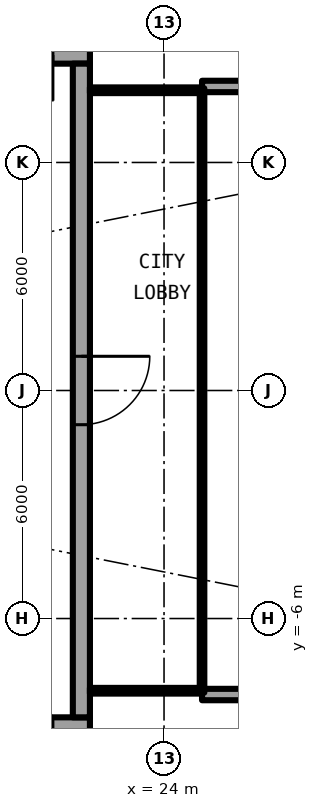
"""IFC4 building model, lengths in metres.
Left out: names, types, materials, properties, quantities, classifications, styles, units other than length and angle.
Written with IfcOpenShell. Run it as: python <this file> out.ifc"""

import sys

from ifc_helpers import new_model, si_unit, direction, frame, frame_2d, origin, place, context, subcontext, project, spatial, rectangle, extrude, element, fill, save


model = new_model("IFC4")
c1 = context("Model", 3, precision=1e-05, world=origin(), true_north=direction((0.0, 1.0)))
c2 = subcontext(c1, "Body", "Model", "MODEL_VIEW")
j1 = project(units=[si_unit("LENGTHUNIT", "METRE"), si_unit("PLANEANGLEUNIT", "RADIAN")], contexts=[c1])
p1 = place(None, origin())
s1 = spatial("IfcSite", under=j1, at=p1, CompositionType="ELEMENT")
p2 = place(p1, origin())
s2 = spatial("IfcBuilding", under=s1, at=p2, CompositionType="ELEMENT")
p3 = place(p2, frame((0.0, 0.0, 218.8)))
s3 = spatial("IfcBuildingStorey", under=s2, at=p3, CompositionType="ELEMENT", Elevation=218.8)
for number, where, z_axis, x_axis in (
    (1, (25.0, 8.0, 0.0), (0.0, 0.0, 1.0), (1.0, 0.0, 0.0)),
    (2, (25.0, -8.0, 0.0), (0.0, 0.0, 1.0), (1.0, 0.0, 0.0)),
):
    element("IfcWall", number, at=place(p3, frame(where, z_axis=z_axis, x_axis=x_axis)), inside=s3, PredefinedType="SOLIDWALL", context=c2, shape_type="SweptSolid", body=[
        extrude(rectangle(XDim=2.667, YDim=0.3, at=frame_2d((1.333, 0.0))), origin(), (0.0, 0.0, 1.0), 2.65),
    ])
p4 = place(p3, frame((22.05, 8.825, 0.0), z_axis=(0.0, 0.0, 1.0), x_axis=(-1.0, 0.0, 0.0)))
e3 = element("IfcWall", 3, at=p4, inside=s3, PredefinedType="SHEAR", context=c2, shape_type="SweptSolid", body=[
    extrude(rectangle(XDim=13.5, YDim=0.45, at=frame_2d((6.75, 0.0))), origin(), (0.0, 0.0, 1.0), 3.05),
])
p5 = place(p4, frame((0.975, 0.0, 0.0)))
e4 = element("IfcOpeningElement", 4, at=p5, cuts=e3, PredefinedType="OPENING", context=c2, shape_type="SweptSolid", body=[
    extrude(rectangle(XDim=1.2, YDim=2.3, at=frame_2d((0.6, 1.15))), frame((0.0, 0.235, 0.0), z_axis=(0.0, -1.0, 0.0), x_axis=(1.0, 0.0, 0.0)), (0.0, 0.0, 1.0), 0.47),
])
p6 = place(p3, frame((8.55, -8.825, 0.0), z_axis=(0.0, 0.0, 1.0), x_axis=(1.0, 0.0, 0.0)))
e5 = element("IfcWall", 5, at=p6, inside=s3, PredefinedType="SHEAR", context=c2, shape_type="SweptSolid", body=[
    extrude(rectangle(XDim=13.5, YDim=0.45, at=frame_2d((6.75, 0.0))), origin(), (0.0, 0.0, 1.0), 3.05),
])
p7 = place(p6, frame((11.325, 0.0, 0.0)))
e6 = element("IfcOpeningElement", 6, at=p7, cuts=e5, PredefinedType="OPENING", context=c2, shape_type="SweptSolid", body=[
    extrude(rectangle(XDim=1.2, YDim=2.3, at=frame_2d((0.6, 1.15))), frame((0.0, 0.235, 0.0), z_axis=(0.0, -1.0, 0.0), x_axis=(1.0, 0.0, 0.0)), (0.0, 0.0, 1.0), 0.47),
])
p8 = place(p3, frame((21.825, 8.6, 0.0), z_axis=(0.0, 0.0, 1.0), x_axis=(0.0, -1.0, 0.0)))
e7 = element("IfcWall", 7, at=p8, inside=s3, PredefinedType="SHEAR", context=c2, shape_type="SweptSolid", body=[
    extrude(rectangle(XDim=17.2, YDim=0.45, at=frame_2d((8.6, 0.0))), origin(), (0.0, 0.0, 1.0), 3.05),
])
p9 = place(p8, frame((7.7, 0.0, 0.0)))
e8 = element("IfcOpeningElement", 8, at=p9, cuts=e7, PredefinedType="OPENING", context=c2, shape_type="SweptSolid", body=[
    extrude(rectangle(XDim=1.8, YDim=2.3, at=frame_2d((0.9, 1.15))), frame((0.0, 0.235, 0.0), z_axis=(0.0, -1.0, 0.0), x_axis=(1.0, 0.0, 0.0)), (0.0, 0.0, 1.0), 0.47),
])
for number, where, z_axis, x_axis in (
    (9, (22.05, -7.9, 0.0), (0.0, 0.0, 1.0), (1.0, 0.0, 0.0)),
    (10, (22.05, 7.9, 0.0), (0.0, 0.0, 1.0), (1.0, 0.0, 0.0)),
):
    element("IfcWall", number, at=place(p3, frame(where, z_axis=z_axis, x_axis=x_axis)), inside=s3, PredefinedType="PARTITIONING", context=c2, shape_type="SweptSolid", body=[
        extrude(rectangle(XDim=2.89, YDim=0.15, at=frame_2d((1.445, 0.0))), origin(), (0.0, 0.0, 1.0), 2.65),
    ])
p10 = place(p3, frame((25.0, -7.95, 0.0), z_axis=(0.0, 0.0, 1.0), x_axis=(0.0, 1.0, 0.0)))
e11 = element("IfcWall", 11, at=p10, inside=s3, PredefinedType="PARTITIONING", context=c2, shape_type="SweptSolid", body=[
    extrude(rectangle(XDim=15.9, YDim=0.12, at=frame_2d((7.95, 0.0))), origin(), (0.0, 0.0, 1.0), 2.65),
])
p11 = place(p10, frame((0.95, 0.0, 0.1)))
e12 = element("IfcOpeningElement", 12, at=p11, cuts=e11, PredefinedType="OPENING", context=c2, shape_type="SweptSolid", body=[
    extrude(rectangle(XDim=14.0, YDim=1.85, at=frame_2d((7.0, 0.925))), frame((0.0, 0.07, 0.0), z_axis=(0.0, -1.0, 0.0), x_axis=(1.0, 0.0, 0.0)), (0.0, 0.0, 1.0), 0.14),
])
p12 = place(p5, origin())
e13 = element("IfcDoor", 13, at=p12, inside=s3, OperationType="SINGLE_SWING_RIGHT", PredefinedType="DOOR", context=c2, shape_type="SweptSolid", body=[
    extrude(rectangle(XDim=1.2, YDim=2.3, at=frame_2d((0.6, 1.15))), frame((0.0, 0.025, 0.0), z_axis=(0.0, -1.0, 0.0), x_axis=(1.0, 0.0, 0.0)), (0.0, 0.0, 1.0), 0.05),
])
fill(e4, e13)
p13 = place(p7, origin())
e14 = element("IfcDoor", 14, at=p13, inside=s3, OperationType="SINGLE_SWING_LEFT", PredefinedType="DOOR", context=c2, shape_type="SweptSolid", body=[
    extrude(rectangle(XDim=1.2, YDim=2.3, at=frame_2d((0.6, 1.15))), frame((0.0, 0.025, 0.0), z_axis=(0.0, -1.0, 0.0), x_axis=(1.0, 0.0, 0.0)), (0.0, 0.0, 1.0), 0.05),
])
fill(e6, e14)
p14 = place(p9, origin())
e15 = element("IfcDoor", 15, at=p14, inside=s3, OperationType="SINGLE_SWING_LEFT", PredefinedType="DOOR", context=c2, shape_type="SweptSolid", body=[
    extrude(rectangle(XDim=1.8, YDim=2.3, at=frame_2d((0.9, 1.15))), frame((0.0, 0.025, 0.0), z_axis=(0.0, -1.0, 0.0), x_axis=(1.0, 0.0, 0.0)), (0.0, 0.0, 1.0), 0.05),
])
fill(e8, e15)
p15 = place(p11, origin())
e16 = element("IfcWindow", 16, at=p15, inside=s3, PartitioningType="SINGLE_PANEL", PredefinedType="WINDOW", context=c2, shape_type="SweptSolid", body=[
    extrude(rectangle(XDim=14.0, YDim=1.85, at=frame_2d((7.0, 0.925))), frame((0.0, 0.03, 0.0), z_axis=(0.0, -1.0, 0.0), x_axis=(1.0, 0.0, 0.0)), (0.0, 0.0, 1.0), 0.06),
])
fill(e12, e16)
save(model, sys.argv[1])
